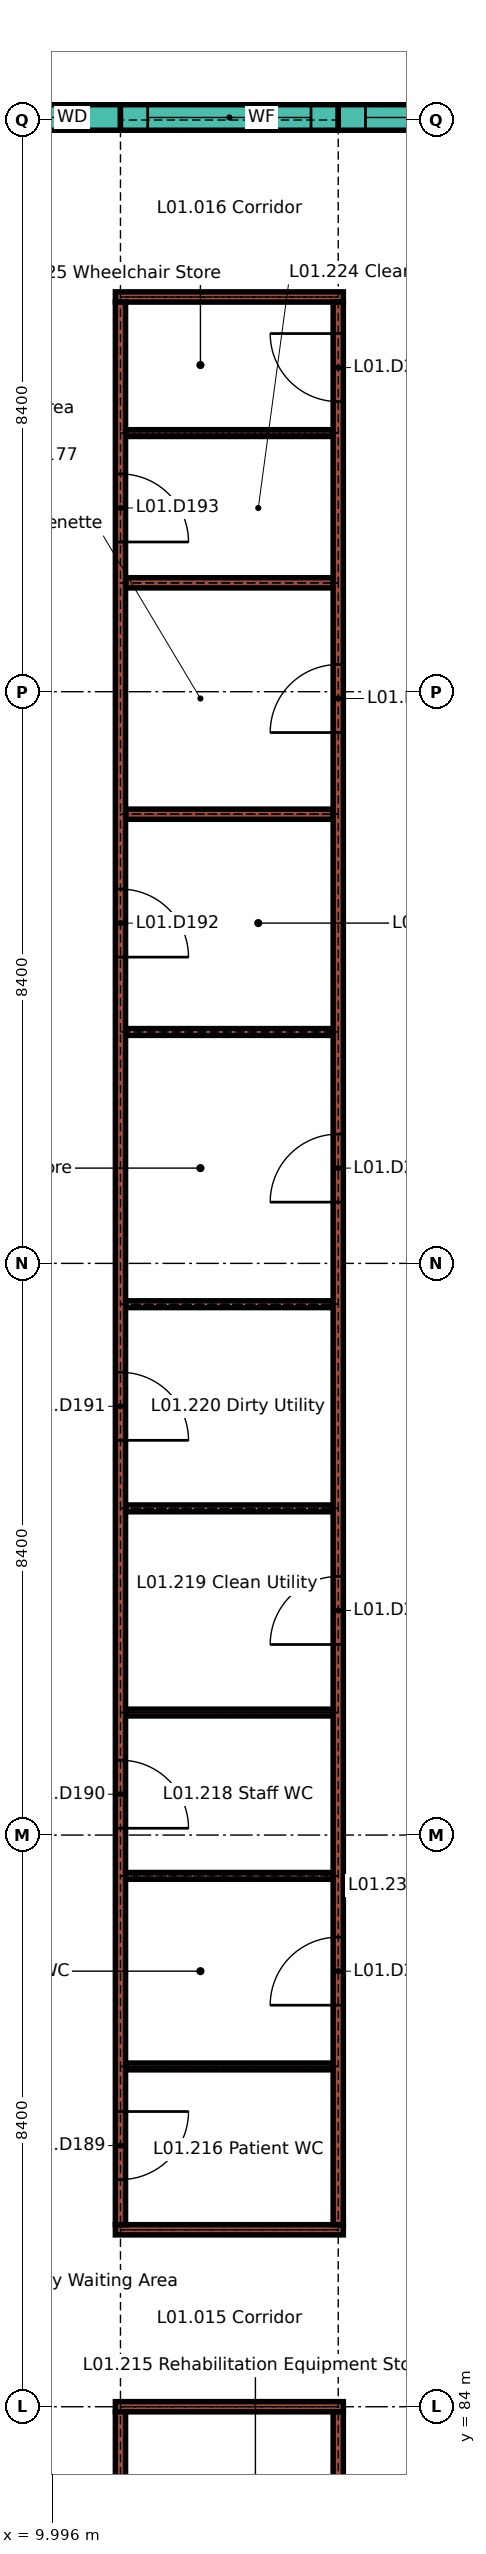
"""IFC4 building model, lengths in metres.
Left out: names, types, materials, properties, quantities, classifications, styles, units other than length and angle.
Written with IfcOpenShell. Run it as: python <this file> out.ifc"""

import sys

from ifc_helpers import new_model, si_unit, direction, frame, frame_2d, origin, place, context, subcontext, project, spatial, rectangle, extrude, element, fill, save


model = new_model("IFC4")
c1 = context("Model", 3, precision=1e-05, world=origin(), true_north=direction((0.0, 1.0)))
c2 = subcontext(c1, "Body", "Model", "MODEL_VIEW")
j1 = project(units=[si_unit("LENGTHUNIT", "METRE"), si_unit("PLANEANGLEUNIT", "RADIAN")], contexts=[c1])
p1 = place(None, origin())
s1 = spatial("IfcSite", under=j1, at=p1, CompositionType="ELEMENT")
p2 = place(p1, origin())
s2 = spatial("IfcBuilding", under=s1, at=p2, CompositionType="ELEMENT")
p3 = place(p2, frame((0.0, 0.0, 4.5)))
s3 = spatial("IfcBuildingStorey", under=s2, at=p3, CompositionType="ELEMENT", Elevation=4.5)
p4 = place(p3, frame((8.825, 117.637, 0.0), z_axis=(0.0, 0.0, 1.0), x_axis=(1.0, 0.0, 0.0)))
e1 = element("IfcWall", 1, at=p4, inside=s3, PredefinedType="SOLIDWALL", context=c2, shape_type="SweptSolid", body=[
    extrude(rectangle(XDim=2.175, YDim=0.375, at=frame_2d((1.087, 0.0))), origin(), (0.0, 0.0, 1.0), 3.45),
])
p5 = place(p4, frame((0.375, 0.0, 0.9)))
e2 = element("IfcOpeningElement", 2, at=p5, cuts=e1, PredefinedType="OPENING", context=c2, shape_type="SweptSolid", body=[
    extrude(rectangle(XDim=1.2, YDim=1.5, at=frame_2d((0.6, 0.75))), frame((0.0, 0.198, 0.0), z_axis=(0.0, -1.0, 0.0), x_axis=(1.0, 0.0, 0.0)), (0.0, 0.0, 1.0), 0.395),
])
p6 = place(p3, frame((11.0, 117.637, 0.0), z_axis=(0.0, 0.0, 1.0), x_axis=(1.0, 0.0, 0.0)))
e3 = element("IfcWall", 3, at=p6, inside=s3, PredefinedType="SOLIDWALL", context=c2, shape_type="SweptSolid", body=[
    extrude(rectangle(XDim=3.2, YDim=0.375, at=frame_2d((1.6, 0.0))), origin(), (0.0, 0.0, 1.0), 3.45),
])
p7 = place(p6, frame((0.4, 0.0, 0.9)))
e4 = element("IfcOpeningElement", 4, at=p7, cuts=e3, PredefinedType="OPENING", context=c2, shape_type="SweptSolid", body=[
    extrude(rectangle(XDim=2.4, YDim=1.5, at=frame_2d((1.2, 0.75))), frame((0.0, 0.198, 0.0), z_axis=(0.0, -1.0, 0.0), x_axis=(1.0, 0.0, 0.0)), (0.0, 0.0, 1.0), 0.395),
])
p8 = place(p3, frame((14.2, 117.637, 0.0), z_axis=(0.0, 0.0, 1.0), x_axis=(1.0, 0.0, 0.0)))
e5 = element("IfcWall", 5, at=p8, inside=s3, PredefinedType="SOLIDWALL", context=c2, shape_type="SweptSolid", body=[
    extrude(rectangle(XDim=2.6, YDim=0.375, at=frame_2d((1.3, 0.0))), origin(), (0.0, 0.0, 1.0), 3.45),
])
p9 = place(p8, frame((0.4, 0.0, 0.9)))
e6 = element("IfcOpeningElement", 6, at=p9, cuts=e5, PredefinedType="OPENING", context=c2, shape_type="SweptSolid", body=[
    extrude(rectangle(XDim=1.8, YDim=1.5, at=frame_2d((0.9, 0.75))), frame((0.0, 0.198, 0.0), z_axis=(0.0, -1.0, 0.0), x_axis=(1.0, 0.0, 0.0)), (0.0, 0.0, 1.0), 0.395),
])
for number, where, z_axis, x_axis in (
    (7, (10.925, 84.0, 0.0), (0.0, 0.0, 1.0), (1.0, 0.0, 0.0)),
    (8, (10.925, 86.6, 0.0), (0.0, 0.0, 1.0), (1.0, 0.0, 0.0)),
):
    element("IfcWall", number, at=place(p3, frame(where, z_axis=z_axis, x_axis=x_axis)), inside=s3, PredefinedType="PARTITIONING", context=c2, shape_type="SweptSolid", body=[
        extrude(rectangle(XDim=3.35, YDim=0.15, at=frame_2d((1.675, 0.0))), origin(), (0.0, 0.0, 1.0), 3.45),
    ])
for number, where, z_axis, x_axis in (
    (9, (11.075, 89.0, 0.0), (0.0, 0.0, 1.0), (1.0, 0.0, 0.0)),
    (10, (11.075, 91.8, 0.0), (0.0, 0.0, 1.0), (1.0, 0.0, 0.0)),
    (11, (11.075, 94.2, 0.0), (0.0, 0.0, 1.0), (1.0, 0.0, 0.0)),
    (12, (11.075, 97.2, 0.0), (0.0, 0.0, 1.0), (1.0, 0.0, 0.0)),
    (13, (11.075, 100.2, 0.0), (0.0, 0.0, 1.0), (1.0, 0.0, 0.0)),
    (14, (11.075, 104.2, 0.0), (0.0, 0.0, 1.0), (1.0, 0.0, 0.0)),
):
    element("IfcWall", number, at=place(p3, frame(where, z_axis=z_axis, x_axis=x_axis)), inside=s3, PredefinedType="PARTITIONING", context=c2, shape_type="SweptSolid", body=[
        extrude(rectangle(XDim=3.05, YDim=0.1, at=frame_2d((1.525, 0.0))), origin(), (0.0, 0.0, 1.0), 3.45),
    ])
for number, where, z_axis, x_axis in (
    (15, (11.075, 107.4, 0.0), (0.0, 0.0, 1.0), (1.0, 0.0, 0.0)),
    (16, (11.075, 110.8, 0.0), (0.0, 0.0, 1.0), (1.0, 0.0, 0.0)),
):
    element("IfcWall", number, at=place(p3, frame(where, z_axis=z_axis, x_axis=x_axis)), inside=s3, PredefinedType="PARTITIONING", context=c2, shape_type="SweptSolid", body=[
        extrude(rectangle(XDim=3.05, YDim=0.15, at=frame_2d((1.525, 0.0))), origin(), (0.0, 0.0, 1.0), 3.45),
    ])
p10 = place(p3, frame((11.075, 113.0, 0.0), z_axis=(0.0, 0.0, 1.0), x_axis=(1.0, 0.0, 0.0)))
e17 = element("IfcWall", 17, at=p10, inside=s3, PredefinedType="PARTITIONING", context=c2, shape_type="SweptSolid", body=[
    extrude(rectangle(XDim=3.05, YDim=0.1, at=frame_2d((1.525, 0.0))), origin(), (0.0, 0.0, 1.0), 3.45),
])
p11 = place(p3, frame((10.925, 115.0, 0.0), z_axis=(0.0, 0.0, 1.0), x_axis=(1.0, 0.0, 0.0)))
e18 = element("IfcWall", 18, at=p11, inside=s3, PredefinedType="PARTITIONING", context=c2, shape_type="SweptSolid", body=[
    extrude(rectangle(XDim=3.35, YDim=0.15, at=frame_2d((1.675, 0.0))), origin(), (0.0, 0.0, 1.0), 3.45),
])
p12 = place(p3, frame((11.0, 69.2, 0.0), z_axis=(0.0, 0.0, 1.0), x_axis=(0.0, 1.0, 0.0)))
e19 = element("IfcWall", 19, at=p12, inside=s3, PredefinedType="PARTITIONING", context=c2, shape_type="SweptSolid", body=[
    extrude(rectangle(XDim=14.725, YDim=0.15, at=frame_2d((7.363, 0.0))), origin(), (0.0, 0.0, 1.0), 3.45),
])
p13 = place(p12, frame((4.6, 0.0, 0.0)))
e20 = element("IfcOpeningElement", 20, at=p13, cuts=e19, PredefinedType="OPENING", context=c2, shape_type="SweptSolid", body=[
    extrude(rectangle(XDim=1.0, YDim=2.1, at=frame_2d((0.5, 1.05))), frame((0.0, 0.085, 0.0), z_axis=(0.0, -1.0, 0.0), x_axis=(1.0, 0.0, 0.0)), (0.0, 0.0, 1.0), 0.17),
])
p14 = place(p12, frame((11.663, 0.0, 0.0)))
e21 = element("IfcOpeningElement", 21, at=p14, cuts=e19, PredefinedType="OPENING", context=c2, shape_type="SweptSolid", body=[
    extrude(rectangle(XDim=1.0, YDim=2.1, at=frame_2d((0.5, 1.05))), frame((0.0, 0.085, 0.0), z_axis=(0.0, -1.0, 0.0), x_axis=(1.0, 0.0, 0.0)), (0.0, 0.0, 1.0), 0.17),
])
p15 = place(p3, frame((11.0, 86.675, 0.0), z_axis=(0.0, 0.0, 1.0), x_axis=(0.0, 1.0, 0.0)))
e22 = element("IfcWall", 22, at=p15, inside=s3, PredefinedType="PARTITIONING", context=c2, shape_type="SweptSolid", body=[
    extrude(rectangle(XDim=28.25, YDim=0.15, at=frame_2d((14.125, 0.0))), origin(), (0.0, 0.0, 1.0), 3.45),
])
p16 = place(p15, frame((0.663, 0.0, 0.0)))
e23 = element("IfcOpeningElement", 23, at=p16, cuts=e22, PredefinedType="OPENING", context=c2, shape_type="SweptSolid", body=[
    extrude(rectangle(XDim=1.0, YDim=2.1, at=frame_2d((0.5, 1.05))), frame((0.0, 0.085, 0.0), z_axis=(0.0, -1.0, 0.0), x_axis=(1.0, 0.0, 0.0)), (0.0, 0.0, 1.0), 0.17),
])
p17 = place(p15, frame((5.825, 0.0, 0.0)))
e24 = element("IfcOpeningElement", 24, at=p17, cuts=e22, PredefinedType="OPENING", context=c2, shape_type="SweptSolid", body=[
    extrude(rectangle(XDim=1.0, YDim=2.1, at=frame_2d((0.5, 1.05))), frame((0.0, 0.085, 0.0), z_axis=(0.0, -1.0, 0.0), x_axis=(1.0, 0.0, 0.0)), (0.0, 0.0, 1.0), 0.17),
])
p18 = place(p15, frame((11.525, 0.0, 0.0)))
e25 = element("IfcOpeningElement", 25, at=p18, cuts=e22, PredefinedType="OPENING", context=c2, shape_type="SweptSolid", body=[
    extrude(rectangle(XDim=1.0, YDim=2.1, at=frame_2d((0.5, 1.05))), frame((0.0, 0.085, 0.0), z_axis=(0.0, -1.0, 0.0), x_axis=(1.0, 0.0, 0.0)), (0.0, 0.0, 1.0), 0.17),
])
p19 = place(p15, frame((18.625, 0.0, 0.0)))
e26 = element("IfcOpeningElement", 26, at=p19, cuts=e22, PredefinedType="OPENING", context=c2, shape_type="SweptSolid", body=[
    extrude(rectangle(XDim=1.0, YDim=2.1, at=frame_2d((0.5, 1.05))), frame((0.0, 0.085, 0.0), z_axis=(0.0, -1.0, 0.0), x_axis=(1.0, 0.0, 0.0)), (0.0, 0.0, 1.0), 0.17),
])
p20 = place(p15, frame((24.725, 0.0, 0.0)))
e27 = element("IfcOpeningElement", 27, at=p20, cuts=e22, PredefinedType="OPENING", context=c2, shape_type="SweptSolid", body=[
    extrude(rectangle(XDim=1.0, YDim=2.1, at=frame_2d((0.5, 1.05))), frame((0.0, 0.085, 0.0), z_axis=(0.0, -1.0, 0.0), x_axis=(1.0, 0.0, 0.0)), (0.0, 0.0, 1.0), 0.17),
])
p21 = place(p3, frame((14.2, 69.2, 0.0), z_axis=(0.0, 0.0, 1.0), x_axis=(0.0, 1.0, 0.0)))
e28 = element("IfcWall", 28, at=p21, inside=s3, PredefinedType="PARTITIONING", context=c2, shape_type="SweptSolid", body=[
    extrude(rectangle(XDim=14.725, YDim=0.15, at=frame_2d((7.363, 0.0))), origin(), (0.0, 0.0, 1.0), 3.45),
])
p22 = place(p21, frame((1.3, 0.0, 0.0)))
e29 = element("IfcOpeningElement", 29, at=p22, cuts=e28, PredefinedType="OPENING", context=c2, shape_type="SweptSolid", body=[
    extrude(rectangle(XDim=1.0, YDim=2.1, at=frame_2d((0.5, 1.05))), frame((0.0, 0.085, 0.0), z_axis=(0.0, -1.0, 0.0), x_axis=(1.0, 0.0, 0.0)), (0.0, 0.0, 1.0), 0.17),
])
p23 = place(p21, frame((7.6, 0.0, 0.0)))
e30 = element("IfcOpeningElement", 30, at=p23, cuts=e28, PredefinedType="OPENING", context=c2, shape_type="SweptSolid", body=[
    extrude(rectangle(XDim=1.0, YDim=2.1, at=frame_2d((0.5, 1.05))), frame((0.0, 0.085, 0.0), z_axis=(0.0, -1.0, 0.0), x_axis=(1.0, 0.0, 0.0)), (0.0, 0.0, 1.0), 0.17),
])
p24 = place(p3, frame((14.2, 86.675, 0.0), z_axis=(0.0, 0.0, 1.0), x_axis=(0.0, 1.0, 0.0)))
e31 = element("IfcWall", 31, at=p24, inside=s3, PredefinedType="PARTITIONING", context=c2, shape_type="SweptSolid", body=[
    extrude(rectangle(XDim=28.25, YDim=0.15, at=frame_2d((14.125, 0.0))), origin(), (0.0, 0.0, 1.0), 3.45),
])
p25 = place(p24, frame((3.225, 0.0, 0.0)))
e32 = element("IfcOpeningElement", 32, at=p25, cuts=e31, PredefinedType="OPENING", context=c2, shape_type="SweptSolid", body=[
    extrude(rectangle(XDim=1.0, YDim=2.1, at=frame_2d((0.5, 1.05))), frame((0.0, 0.085, 0.0), z_axis=(0.0, -1.0, 0.0), x_axis=(1.0, 0.0, 0.0)), (0.0, 0.0, 1.0), 0.17),
])
p26 = place(p24, frame((8.525, 0.0, 0.0)))
e33 = element("IfcOpeningElement", 33, at=p26, cuts=e31, PredefinedType="OPENING", context=c2, shape_type="SweptSolid", body=[
    extrude(rectangle(XDim=1.0, YDim=2.1, at=frame_2d((0.5, 1.05))), frame((0.0, 0.085, 0.0), z_axis=(0.0, -1.0, 0.0), x_axis=(1.0, 0.0, 0.0)), (0.0, 0.0, 1.0), 0.17),
])
p27 = place(p24, frame((15.025, 0.0, 0.0)))
e34 = element("IfcOpeningElement", 34, at=p27, cuts=e31, PredefinedType="OPENING", context=c2, shape_type="SweptSolid", body=[
    extrude(rectangle(XDim=1.0, YDim=2.1, at=frame_2d((0.5, 1.05))), frame((0.0, 0.085, 0.0), z_axis=(0.0, -1.0, 0.0), x_axis=(1.0, 0.0, 0.0)), (0.0, 0.0, 1.0), 0.17),
])
p28 = place(p24, frame((21.925, 0.0, 0.0)))
e35 = element("IfcOpeningElement", 35, at=p28, cuts=e31, PredefinedType="OPENING", context=c2, shape_type="SweptSolid", body=[
    extrude(rectangle(XDim=1.0, YDim=2.1, at=frame_2d((0.5, 1.05))), frame((0.0, 0.085, 0.0), z_axis=(0.0, -1.0, 0.0), x_axis=(1.0, 0.0, 0.0)), (0.0, 0.0, 1.0), 0.17),
])
p29 = place(p24, frame((26.788, 0.0, 0.0)))
e36 = element("IfcOpeningElement", 36, at=p29, cuts=e31, PredefinedType="OPENING", context=c2, shape_type="SweptSolid", body=[
    extrude(rectangle(XDim=1.0, YDim=2.1, at=frame_2d((0.5, 1.05))), frame((0.0, 0.085, 0.0), z_axis=(0.0, -1.0, 0.0), x_axis=(1.0, 0.0, 0.0)), (0.0, 0.0, 1.0), 0.17),
])
p30 = place(p5, origin())
e37 = element("IfcWindow", 37, at=p30, inside=s3, PartitioningType="SINGLE_PANEL", PredefinedType="WINDOW", context=c2, shape_type="SweptSolid", body=[
    extrude(rectangle(XDim=1.2, YDim=1.5, at=frame_2d((0.6, 0.75))), frame((0.0, 0.03, 0.0), z_axis=(0.0, -1.0, 0.0), x_axis=(1.0, 0.0, 0.0)), (0.0, 0.0, 1.0), 0.06),
])
fill(e2, e37)
p31 = place(p7, origin())
e38 = element("IfcWindow", 38, at=p31, inside=s3, PartitioningType="DOUBLE_PANEL_VERTICAL", PredefinedType="WINDOW", context=c2, shape_type="SweptSolid", body=[
    extrude(rectangle(XDim=2.4, YDim=1.5, at=frame_2d((1.2, 0.75))), frame((0.0, 0.03, 0.0), z_axis=(0.0, -1.0, 0.0), x_axis=(1.0, 0.0, 0.0)), (0.0, 0.0, 1.0), 0.06),
])
fill(e4, e38)
p32 = place(p9, origin())
e39 = element("IfcWindow", 39, at=p32, inside=s3, PartitioningType="DOUBLE_PANEL_VERTICAL", PredefinedType="WINDOW", context=c2, shape_type="SweptSolid", body=[
    extrude(rectangle(XDim=1.8, YDim=1.5, at=frame_2d((0.9, 0.75))), frame((0.0, 0.03, 0.0), z_axis=(0.0, -1.0, 0.0), x_axis=(1.0, 0.0, 0.0)), (0.0, 0.0, 1.0), 0.06),
])
fill(e6, e39)
p33 = place(p16, origin())
e40 = element("IfcDoor", 40, at=p33, inside=s3, OperationType="SINGLE_SWING_RIGHT", PredefinedType="DOOR", context=c2, shape_type="SweptSolid", body=[
    extrude(rectangle(XDim=1.0, YDim=2.1, at=frame_2d((0.5, 1.05))), frame((0.0, 0.025, 0.0), z_axis=(0.0, -1.0, 0.0), x_axis=(1.0, 0.0, 0.0)), (0.0, 0.0, 1.0), 0.05),
])
fill(e23, e40)
p34 = place(p17, origin())
e41 = element("IfcDoor", 41, at=p34, inside=s3, OperationType="SINGLE_SWING_LEFT", PredefinedType="DOOR", context=c2, shape_type="SweptSolid", body=[
    extrude(rectangle(XDim=1.0, YDim=2.1, at=frame_2d((0.5, 1.05))), frame((0.0, 0.025, 0.0), z_axis=(0.0, -1.0, 0.0), x_axis=(1.0, 0.0, 0.0)), (0.0, 0.0, 1.0), 0.05),
])
fill(e24, e41)
p35 = place(p18, origin())
e42 = element("IfcDoor", 42, at=p35, inside=s3, OperationType="SINGLE_SWING_LEFT", PredefinedType="DOOR", context=c2, shape_type="SweptSolid", body=[
    extrude(rectangle(XDim=1.0, YDim=2.1, at=frame_2d((0.5, 1.05))), frame((0.0, 0.025, 0.0), z_axis=(0.0, -1.0, 0.0), x_axis=(1.0, 0.0, 0.0)), (0.0, 0.0, 1.0), 0.05),
])
fill(e25, e42)
p36 = place(p19, origin())
e43 = element("IfcDoor", 43, at=p36, inside=s3, OperationType="SINGLE_SWING_LEFT", PredefinedType="DOOR", context=c2, shape_type="SweptSolid", body=[
    extrude(rectangle(XDim=1.0, YDim=2.1, at=frame_2d((0.5, 1.05))), frame((0.0, 0.025, 0.0), z_axis=(0.0, -1.0, 0.0), x_axis=(1.0, 0.0, 0.0)), (0.0, 0.0, 1.0), 0.05),
])
fill(e26, e43)
p37 = place(p20, origin())
e44 = element("IfcDoor", 44, at=p37, inside=s3, OperationType="SINGLE_SWING_LEFT", PredefinedType="DOOR", context=c2, shape_type="SweptSolid", body=[
    extrude(rectangle(XDim=1.0, YDim=2.1, at=frame_2d((0.5, 1.05))), frame((0.0, 0.025, 0.0), z_axis=(0.0, -1.0, 0.0), x_axis=(1.0, 0.0, 0.0)), (0.0, 0.0, 1.0), 0.05),
])
fill(e27, e44)
p38 = place(p25, origin())
e45 = element("IfcDoor", 45, at=p38, inside=s3, OperationType="SINGLE_SWING_RIGHT", PredefinedType="DOOR", context=c2, shape_type="SweptSolid", body=[
    extrude(rectangle(XDim=1.0, YDim=2.1, at=frame_2d((0.5, 1.05))), frame((0.0, 0.025, 0.0), z_axis=(0.0, -1.0, 0.0), x_axis=(1.0, 0.0, 0.0)), (0.0, 0.0, 1.0), 0.05),
])
fill(e32, e45)
p39 = place(p26, origin())
e46 = element("IfcDoor", 46, at=p39, inside=s3, OperationType="SINGLE_SWING_RIGHT", PredefinedType="DOOR", context=c2, shape_type="SweptSolid", body=[
    extrude(rectangle(XDim=1.0, YDim=2.1, at=frame_2d((0.5, 1.05))), frame((0.0, 0.025, 0.0), z_axis=(0.0, -1.0, 0.0), x_axis=(1.0, 0.0, 0.0)), (0.0, 0.0, 1.0), 0.05),
])
fill(e33, e46)
p40 = place(p27, origin())
e47 = element("IfcDoor", 47, at=p40, inside=s3, OperationType="SINGLE_SWING_RIGHT", PredefinedType="DOOR", context=c2, shape_type="SweptSolid", body=[
    extrude(rectangle(XDim=1.0, YDim=2.1, at=frame_2d((0.5, 1.05))), frame((0.0, 0.025, 0.0), z_axis=(0.0, -1.0, 0.0), x_axis=(1.0, 0.0, 0.0)), (0.0, 0.0, 1.0), 0.05),
])
fill(e34, e47)
p41 = place(p28, origin())
e48 = element("IfcDoor", 48, at=p41, inside=s3, OperationType="SINGLE_SWING_RIGHT", PredefinedType="DOOR", context=c2, shape_type="SweptSolid", body=[
    extrude(rectangle(XDim=1.0, YDim=2.1, at=frame_2d((0.5, 1.05))), frame((0.0, 0.025, 0.0), z_axis=(0.0, -1.0, 0.0), x_axis=(1.0, 0.0, 0.0)), (0.0, 0.0, 1.0), 0.05),
])
fill(e35, e48)
p42 = place(p29, origin())
e49 = element("IfcDoor", 49, at=p42, inside=s3, OperationType="SINGLE_SWING_LEFT", PredefinedType="DOOR", context=c2, shape_type="SweptSolid", body=[
    extrude(rectangle(XDim=1.0, YDim=2.1, at=frame_2d((0.5, 1.05))), frame((0.0, 0.025, 0.0), z_axis=(0.0, -1.0, 0.0), x_axis=(1.0, 0.0, 0.0)), (0.0, 0.0, 1.0), 0.05),
])
fill(e36, e49)
save(model, sys.argv[1])
